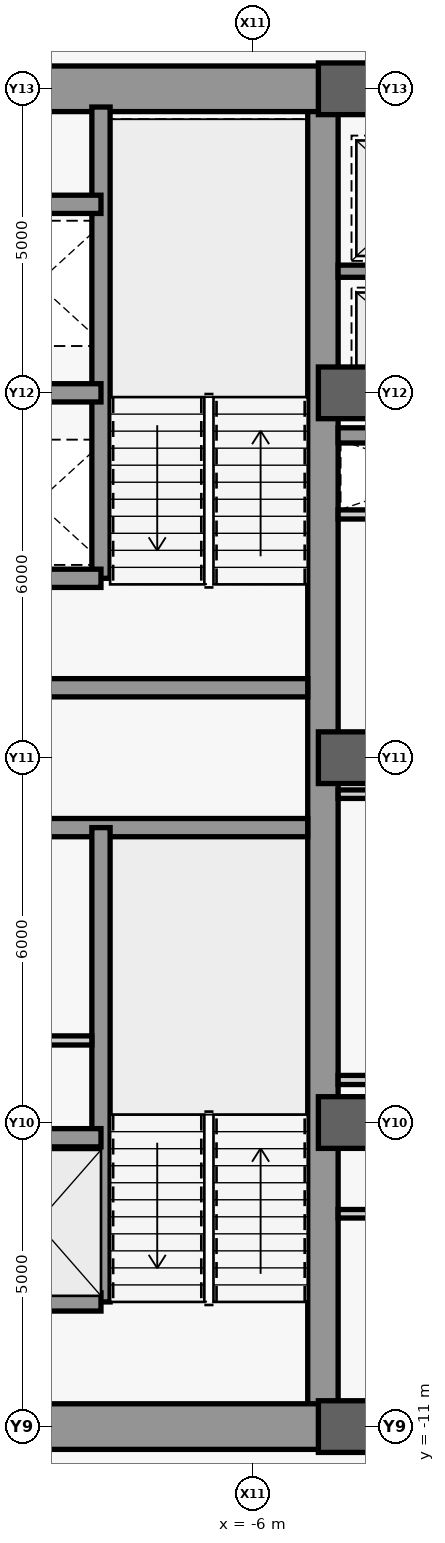
"""IFC4 building model, lengths in metres.
Left out: names, types, materials, properties, quantities, classifications, styles, units other than length and angle.
Written with IfcOpenShell. Run it as: python <this file> out.ifc"""

import sys

from ifc_helpers import new_model, si_unit, direction, frame, frame_2d, origin, origin_2d, place, context, subcontext, project, spatial, rectangle, extrude, source, transform, mapped, element, save


model = new_model("IFC4")
c1 = context("Model", 3, precision=1e-05, world=origin(), true_north=direction((0.0, 1.0)))
c2 = subcontext(c1, "Body", "Model", "MODEL_VIEW")
j1 = project(units=[si_unit("LENGTHUNIT", "METRE"), si_unit("PLANEANGLEUNIT", "RADIAN")], contexts=[c1])
p1 = place(None, origin())
s1 = spatial("IfcSite", under=j1, at=p1, CompositionType="ELEMENT")
p2 = place(p1, origin())
s2 = spatial("IfcBuilding", under=s1, at=p2, CompositionType="ELEMENT")
p3 = place(p2, frame((0.0, 0.0, 159.1)))
s3 = spatial("IfcBuildingStorey", under=s2, at=p3, CompositionType="ELEMENT", Elevation=159.1)
m1 = source(origin(), c2, "Body", "SweptSolid", [
    extrude(rectangle(XDim=21.4, YDim=0.5, at=frame_2d((10.7, 0.0))), origin(), (0.0, 0.0, 1.0), 3.78),
])
p4 = place(p3, frame((-4.85, -10.7, 0.0), z_axis=(0.0, 0.0, 1.0), x_axis=(0.0, 1.0, 0.0)))
e1 = element("IfcWall", 1, at=p4, inside=s3, PredefinedType="SHEAR", context=c2, shape_type="MappedRepresentation", body=[
    mapped(m1, transform((0.0, 0.0, 0.0), scale=1.0)),
])
m2 = source(origin(), c2, "Body", "SweptSolid", [
    extrude(rectangle(XDim=5.85, YDim=0.75, at=frame_2d((2.925, 0.0))), origin(), (0.0, 0.0, 1.0), 3.78),
])
for number, where, z_axis, x_axis in (
    (2, (-10.7, -11.0, 0.0), (0.0, 0.0, 1.0), (1.0, 0.0, 0.0)),
    (3, (-10.7, 11.0, 0.0), (0.0, 0.0, 1.0), (1.0, 0.0, 0.0)),
):
    element("IfcWall", number, at=place(p3, frame(where, z_axis=z_axis, x_axis=x_axis)), inside=s3, PredefinedType="SHEAR", context=c2, shape_type="MappedRepresentation", body=[
        mapped(m2, transform((0.0, 0.0, 0.0), scale=1.0)),
    ])
m3 = source(origin(), c2, "Body", "SweptSolid", [
    extrude(rectangle(XDim=5.6, YDim=0.3, at=frame_2d((2.8, 0.0))), origin(), (0.0, 0.0, 1.0), 3.78),
])
for number, where, z_axis, x_axis in (
    (4, (-10.7, -1.15, 0.0), (0.0, 0.0, 1.0), (1.0, 0.0, 0.0)),
    (5, (-10.7, 1.15, 0.0), (0.0, 0.0, 1.0), (1.0, 0.0, 0.0)),
):
    element("IfcWall", number, at=place(p3, frame(where, z_axis=z_axis, x_axis=x_axis)), inside=s3, PredefinedType="SHEAR", context=c2, shape_type="MappedRepresentation", body=[
        mapped(m3, transform((0.0, 0.0, 0.0), scale=1.0)),
    ])
m4 = source(origin(), c2, "Body", "SweptSolid", [
    extrude(rectangle(XDim=9.2, YDim=0.5, at=frame_2d((4.6, 0.0))), origin(), (0.0, 0.0, 1.0), 3.78),
])
p5 = place(p3, frame((-4.6, -11.0, 0.0), z_axis=(0.0, 0.0, 1.0), x_axis=(1.0, 0.0, 0.0)))
e6 = element("IfcWall", 6, at=p5, inside=s3, PredefinedType="SHEAR", context=c2, shape_type="MappedRepresentation", body=[
    mapped(m4, transform((0.0, 0.0, 0.0), scale=1.0)),
])
m5 = source(origin(), c2, "Body", "SweptSolid", [
    extrude(rectangle(XDim=1.8, YDim=2.25, at=frame_2d((0.9, 1.125))), frame((0.0, 0.26, 0.0), z_axis=(0.0, -1.0, 0.0), x_axis=(1.0, 0.0, 0.0)), (0.0, 0.0, 1.0), 0.52),
])
p6 = place(p5, frame((3.7, 0.0, 0.0)))
e7 = element("IfcOpeningElement", 7, at=p6, cuts=e6, PredefinedType="OPENING", context=c2, shape_type="MappedRepresentation", body=[
    mapped(m5, transform((0.0, 0.0, 0.0), scale=1.0)),
])
p7 = place(p3, frame((-4.6, 11.0, 0.0), z_axis=(0.0, 0.0, 1.0), x_axis=(1.0, 0.0, 0.0)))
e8 = element("IfcWall", 8, at=p7, inside=s3, PredefinedType="SHEAR", context=c2, shape_type="MappedRepresentation", body=[
    mapped(m4, transform((0.0, 0.0, 0.0), scale=1.0)),
])
p8 = place(p7, frame((3.7, 0.0, 0.0)))
e9 = element("IfcOpeningElement", 9, at=p8, cuts=e8, PredefinedType="OPENING", context=c2, shape_type="MappedRepresentation", body=[
    mapped(m5, transform((0.0, 0.0, 0.0), scale=1.0)),
])
m6 = source(origin(), c2, "Body", "SweptSolid", [
    extrude(rectangle(XDim=0.85, YDim=0.85, at=origin_2d()), origin(), (0.0, 0.0, 1.0), 4.0),
])
for number, where, z_axis, x_axis in (
    (10, (-4.5, -11.0, 0.0), (0.0, 0.0, 1.0), (1.0, 0.0, 0.0)),
    (11, (-4.5, -6.0, 0.0), (0.0, 0.0, 1.0), (1.0, 0.0, 0.0)),
    (12, (-4.5, 0.0, 0.0), (0.0, 0.0, 1.0), (1.0, 0.0, 0.0)),
    (13, (-4.5, 6.0, 0.0), (0.0, 0.0, 1.0), (1.0, 0.0, 0.0)),
    (14, (-4.5, 11.0, 0.0), (0.0, 0.0, 1.0), (1.0, 0.0, 0.0)),
):
    element("IfcColumn", number, at=place(p3, frame(where, z_axis=z_axis, x_axis=x_axis)), inside=s3, PredefinedType="COLUMN", context=c2, shape_type="MappedRepresentation", body=[
        mapped(m6, transform((0.0, 0.0, 0.0), scale=1.0)),
    ])
m7 = source(origin(), c2, "Body", "SweptSolid", [
    extrude(rectangle(XDim=7.8, YDim=0.3, at=frame_2d((3.9, 0.0))), origin(), (0.0, 0.0, 1.0), 3.78),
])
p9 = place(p3, frame((-8.5, -8.95, 0.0), z_axis=(0.0, 0.0, 1.0), x_axis=(0.0, 1.0, 0.0)))
e15 = element("IfcWall", 15, at=p9, inside=s3, PredefinedType="SHEAR", context=c2, shape_type="MappedRepresentation", body=[
    mapped(m7, transform((0.0, 0.0, 0.0), scale=1.0)),
])
m8 = source(origin(), c2, "Body", "SweptSolid", [
    extrude(rectangle(XDim=2.2, YDim=0.3, at=frame_2d((1.1, 0.0))), origin(), (0.0, 0.0, 1.0), 3.78),
])
for number, where, z_axis, x_axis in (
    (16, (-10.7, -8.95, 0.0), (0.0, 0.0, 1.0), (1.0, 0.0, 0.0)),
    (17, (-10.7, -6.25, 0.0), (0.0, 0.0, 1.0), (1.0, 0.0, 0.0)),
):
    element("IfcWall", number, at=place(p3, frame(where, z_axis=z_axis, x_axis=x_axis)), inside=s3, PredefinedType="SHEAR", context=c2, shape_type="MappedRepresentation", body=[
        mapped(m8, transform((0.0, 0.0, 0.0), scale=1.0)),
    ])
m9 = source(origin(), c2, "Body", "SweptSolid", [
    extrude(rectangle(XDim=7.75, YDim=0.3, at=frame_2d((3.875, 0.0))), origin(), (0.0, 0.0, 1.0), 3.78),
])
p10 = place(p3, frame((-8.5, 2.95, 0.0), z_axis=(0.0, 0.0, 1.0), x_axis=(0.0, 1.0, 0.0)))
e18 = element("IfcWall", 18, at=p10, inside=s3, PredefinedType="SHEAR", context=c2, shape_type="MappedRepresentation", body=[
    mapped(m9, transform((0.0, 0.0, 0.0), scale=1.0)),
])
for number, where, z_axis, x_axis in (
    (19, (-10.7, 2.95, 0.0), (0.0, 0.0, 1.0), (1.0, 0.0, 0.0)),
    (20, (-10.7, 6.0, 0.0), (0.0, 0.0, 1.0), (1.0, 0.0, 0.0)),
    (21, (-10.7, 9.1, 0.0), (0.0, 0.0, 1.0), (1.0, 0.0, 0.0)),
):
    element("IfcWall", number, at=place(p3, frame(where, z_axis=z_axis, x_axis=x_axis)), inside=s3, PredefinedType="SHEAR", context=c2, shape_type="MappedRepresentation", body=[
        mapped(m8, transform((0.0, 0.0, 0.0), scale=1.0)),
    ])
m10 = source(origin(), c2, "Body", "SweptSolid", [
    extrude(rectangle(XDim=2.05, YDim=0.15, at=frame_2d((1.025, 0.0))), origin(), (0.0, 0.0, 1.0), 3.78),
])
p11 = place(p3, frame((-10.7, -4.65, 0.0), z_axis=(0.0, 0.0, 1.0), x_axis=(1.0, 0.0, 0.0)))
e22 = element("IfcWall", 22, at=p11, inside=s3, PredefinedType="PARTITIONING", context=c2, shape_type="MappedRepresentation", body=[
    mapped(m10, transform((0.0, 0.0, 0.0), scale=1.0)),
])
m11 = source(origin(), c2, "Body", "SweptSolid", [
    extrude(rectangle(XDim=3.45, YDim=0.15, at=frame_2d((1.725, 0.0))), origin(), (0.0, 0.0, 1.0), 3.78),
])
p12 = place(p3, frame((-4.6, 4.0, 0.0), z_axis=(0.0, 0.0, 1.0), x_axis=(1.0, 0.0, 0.0)))
e23 = element("IfcWall", 23, at=p12, inside=s3, PredefinedType="PARTITIONING", context=c2, shape_type="MappedRepresentation", body=[
    mapped(m11, transform((0.0, 0.0, 0.0), scale=1.0)),
])
m12 = source(origin(), c2, "Body", "SweptSolid", [
    extrude(rectangle(XDim=3.45, YDim=0.14, at=frame_2d((1.725, 0.0))), origin(), (0.0, 0.0, 1.0), 3.78),
])
p13 = place(p3, frame((-4.6, -7.5, 0.0), z_axis=(0.0, 0.0, 1.0), x_axis=(1.0, 0.0, 0.0)))
e24 = element("IfcWall", 24, at=p13, inside=s3, PredefinedType="PARTITIONING", context=c2, shape_type="MappedRepresentation", body=[
    mapped(m12, transform((0.0, 0.0, 0.0), scale=1.0)),
])
p14 = place(p3, frame((-4.6, -5.3, 0.0), z_axis=(0.0, 0.0, 1.0), x_axis=(1.0, 0.0, 0.0)))
e25 = element("IfcWall", 25, at=p14, inside=s3, PredefinedType="PARTITIONING", context=c2, shape_type="MappedRepresentation", body=[
    mapped(m11, transform((0.0, 0.0, 0.0), scale=1.0)),
])
m13 = source(origin(), c2, "Body", "SweptSolid", [
    extrude(rectangle(XDim=2.45, YDim=0.2, at=frame_2d((1.225, 0.0))), origin(), (0.0, 0.0, 1.0), 3.78),
])
p15 = place(p3, frame((-4.6, 8.0, 0.0), z_axis=(0.0, 0.0, 1.0), x_axis=(1.0, 0.0, 0.0)))
e26 = element("IfcWall", 26, at=p15, inside=s3, PredefinedType="SHEAR", context=c2, shape_type="MappedRepresentation", body=[
    mapped(m13, transform((0.0, 0.0, 0.0), scale=1.0)),
])
m14 = source(origin(), c2, "Body", "SweptSolid", [
    extrude(rectangle(XDim=9.2, YDim=0.25, at=frame_2d((4.6, 0.0))), origin(), (0.0, 0.0, 1.0), 3.78),
])
p16 = place(p3, frame((-4.6, 5.3, 0.0), z_axis=(0.0, 0.0, 1.0), x_axis=(1.0, 0.0, 0.0)))
e27 = element("IfcWall", 27, at=p16, inside=s3, PredefinedType="SHEAR", context=c2, shape_type="MappedRepresentation", body=[
    mapped(m14, transform((0.0, 0.0, 0.0), scale=1.0)),
])
m15 = source(origin(), c2, "Body", "SweptSolid", [
    extrude(rectangle(XDim=1.05, YDim=2.2, at=frame_2d((0.525, 1.1))), frame((0.0, 0.135, 0.0), z_axis=(0.0, -1.0, 0.0), x_axis=(1.0, 0.0, 0.0)), (0.0, 0.0, 1.0), 0.27),
])
p17 = place(p16, frame((4.075, 0.0, 0.0)))
e28 = element("IfcOpeningElement", 28, at=p17, cuts=e27, PredefinedType="OPENING", context=c2, shape_type="MappedRepresentation", body=[
    mapped(m15, transform((0.0, 0.0, 0.0), scale=1.0)),
])
p18 = place(p3, frame((-4.6, -0.6, 0.0), z_axis=(0.0, 0.0, 1.0), x_axis=(1.0, 0.0, 0.0)))
e29 = element("IfcWall", 29, at=p18, inside=s3, PredefinedType="PARTITIONING", context=c2, shape_type="MappedRepresentation", body=[
    mapped(m12, transform((0.0, 0.0, 0.0), scale=1.0)),
])
save(model, sys.argv[1])
